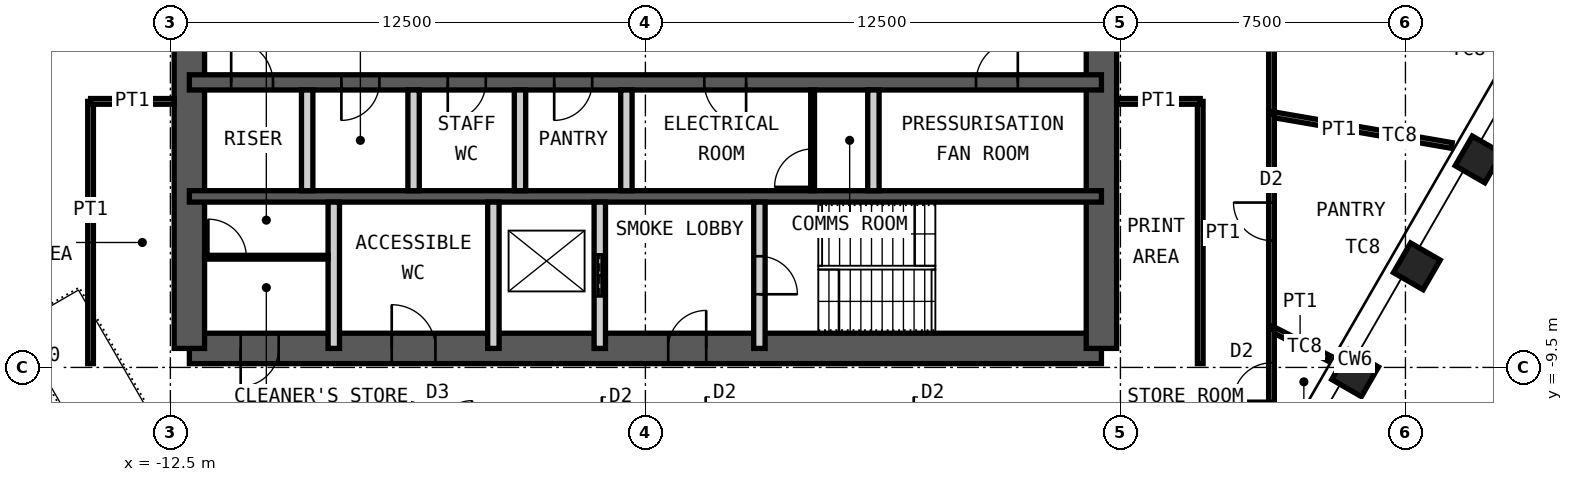
"""IFC4 building model, lengths in metres.
Left out: names, types, materials, properties, quantities, classifications, styles, units other than length and angle.
Written with IfcOpenShell. Run it as: python <this file> out.ifc"""

import sys

from ifc_helpers import new_model, si_unit, direction, frame, frame_2d, origin, origin_2d, place, context, subcontext, project, spatial, rectangle, hollow_rectangle, extrude, element, fill, save


model = new_model("IFC4")
c1 = context("Model", 3, precision=1e-05, world=origin(), true_north=direction((0.0, 1.0)))
c2 = subcontext(c1, "Body", "Model", "MODEL_VIEW")
j1 = project(units=[si_unit("LENGTHUNIT", "METRE"), si_unit("PLANEANGLEUNIT", "RADIAN")], contexts=[c1])
p1 = place(None, origin())
s1 = spatial("IfcSite", under=j1, at=p1, CompositionType="ELEMENT")
p2 = place(p1, origin())
s2 = spatial("IfcBuilding", under=s1, at=p2, CompositionType="ELEMENT")
p3 = place(p2, frame((0.0, 0.0, 333.4)))
s3 = spatial("IfcBuildingStorey", under=s2, at=p3, CompositionType="ELEMENT", Elevation=333.4)
for number, where, z_axis, x_axis in (
    (1, (21.924, -4.027, 0.0), (0.0, 0.0, 1.0), (0.5, 0.866, 0.0)),
    (2, (20.3, -6.84, 0.0), (0.0, 0.0, 1.0), (0.5, 0.866, 0.0)),
    (3, (18.676, -9.653, 0.0), (0.0, 0.0, 1.0), (0.5, 0.866, 0.0)),
):
    element("IfcColumn", number, at=place(p3, frame(where, z_axis=z_axis, x_axis=x_axis)), inside=s3, PredefinedType="COLUMN", context=c2, shape_type="SweptSolid", body=[
        extrude(hollow_rectangle(XDim=0.9, YDim=0.9, WallThickness=0.05, at=origin_2d()), origin(), (0.0, 0.0, 1.0), 4.2),
    ])
p4 = place(p3, frame((-12.0, -9.0, 0.0), z_axis=(0.0, 0.0, 1.0), x_axis=(1.0, 0.0, 0.0)))
e4 = element("IfcWall", 4, at=p4, inside=s3, PredefinedType="SHEAR", context=c2, shape_type="SweptSolid", body=[
    extrude(rectangle(XDim=24.0, YDim=0.8, at=frame_2d((12.0, 0.0))), origin(), (0.0, 0.0, 1.0), 4.2),
])
p5 = place(p4, frame((1.35, 0.0, 0.0)))
e5 = element("IfcOpeningElement", 5, at=p5, cuts=e4, PredefinedType="OPENING", context=c2, shape_type="SweptSolid", body=[
    extrude(rectangle(XDim=1.0, YDim=2.1, at=frame_2d((0.5, 1.05))), frame((0.0, 0.41, 0.0), z_axis=(0.0, -1.0, 0.0), x_axis=(1.0, 0.0, 0.0)), (0.0, 0.0, 1.0), 0.82),
])
p6 = place(p4, frame((5.325, 0.0, 0.0)))
e6 = element("IfcOpeningElement", 6, at=p6, cuts=e4, PredefinedType="OPENING", context=c2, shape_type="SweptSolid", body=[
    extrude(rectangle(XDim=1.15, YDim=2.1, at=frame_2d((0.575, 1.05))), frame((0.0, 0.41, 0.0), z_axis=(0.0, -1.0, 0.0), x_axis=(1.0, 0.0, 0.0)), (0.0, 0.0, 1.0), 0.82),
])
p7 = place(p4, frame((12.6, 0.0, 0.0)))
e7 = element("IfcOpeningElement", 7, at=p7, cuts=e4, PredefinedType="OPENING", context=c2, shape_type="SweptSolid", body=[
    extrude(rectangle(XDim=1.0, YDim=2.1, at=frame_2d((0.5, 1.05))), frame((0.0, 0.41, 0.0), z_axis=(0.0, -1.0, 0.0), x_axis=(1.0, 0.0, 0.0)), (0.0, 0.0, 1.0), 0.82),
])
p8 = place(p3, frame((12.0, -9.0, 0.0), z_axis=(0.0, 0.0, 1.0), x_axis=(0.0, 1.0, 0.0)))
e8 = element("IfcWall", 8, at=p8, inside=s3, PredefinedType="SHEAR", context=c2, shape_type="SweptSolid", body=[
    extrude(rectangle(XDim=18.0, YDim=0.8, at=frame_2d((9.0, 0.0))), origin(), (0.0, 0.0, 1.0), 4.2),
])
p9 = place(p8, frame((8.1, 0.0, 0.0)))
e9 = element("IfcOpeningElement", 9, at=p9, cuts=e8, PredefinedType="OPENING", context=c2, shape_type="SweptSolid", body=[
    extrude(rectangle(XDim=1.8, YDim=2.1, at=frame_2d((0.9, 1.05))), frame((0.0, 0.41, 0.0), z_axis=(0.0, -1.0, 0.0), x_axis=(1.0, 0.0, 0.0)), (0.0, 0.0, 1.0), 0.82),
])
p10 = place(p3, frame((-12.0, -9.0, 0.0), z_axis=(0.0, 0.0, 1.0), x_axis=(0.0, 1.0, 0.0)))
e10 = element("IfcWall", 10, at=p10, inside=s3, PredefinedType="SHEAR", context=c2, shape_type="SweptSolid", body=[
    extrude(rectangle(XDim=18.0, YDim=0.8, at=frame_2d((9.0, 0.0))), origin(), (0.0, 0.0, 1.0), 4.2),
])
p11 = place(p10, frame((8.1, 0.0, 0.0)))
e11 = element("IfcOpeningElement", 11, at=p11, cuts=e10, PredefinedType="OPENING", context=c2, shape_type="SweptSolid", body=[
    extrude(rectangle(XDim=1.8, YDim=2.1, at=frame_2d((0.9, 1.05))), frame((0.0, 0.41, 0.0), z_axis=(0.0, -1.0, 0.0), x_axis=(1.0, 0.0, 0.0)), (0.0, 0.0, 1.0), 0.82),
])
p12 = place(p3, frame((-12.0, -2.0, 0.0), z_axis=(0.0, 0.0, 1.0), x_axis=(1.0, 0.0, 0.0)))
e12 = element("IfcWall", 12, at=p12, inside=s3, PredefinedType="SHEAR", context=c2, shape_type="SweptSolid", body=[
    extrude(rectangle(XDim=24.0, YDim=0.4, at=frame_2d((12.0, 0.0))), origin(), (0.0, 0.0, 1.0), 4.2),
])
p13 = place(p12, frame((1.1, 0.0, 0.0)))
e13 = element("IfcOpeningElement", 13, at=p13, cuts=e12, PredefinedType="OPENING", context=c2, shape_type="SweptSolid", body=[
    extrude(rectangle(XDim=1.1, YDim=2.1, at=frame_2d((0.55, 1.05))), frame((0.0, 0.21, 0.0), z_axis=(0.0, -1.0, 0.0), x_axis=(1.0, 0.0, 0.0)), (0.0, 0.0, 1.0), 0.42),
])
p14 = place(p12, frame((13.55, 0.0, 0.0)))
e14 = element("IfcOpeningElement", 14, at=p14, cuts=e12, PredefinedType="OPENING", context=c2, shape_type="SweptSolid", body=[
    extrude(rectangle(XDim=1.1, YDim=2.1, at=frame_2d((0.55, 1.05))), frame((0.0, 0.21, 0.0), z_axis=(0.0, -1.0, 0.0), x_axis=(1.0, 0.0, 0.0)), (0.0, 0.0, 1.0), 0.42),
])
p15 = place(p12, frame((20.7, 0.0, 0.0)))
e15 = element("IfcOpeningElement", 15, at=p15, cuts=e12, PredefinedType="OPENING", context=c2, shape_type="SweptSolid", body=[
    extrude(rectangle(XDim=1.1, YDim=2.1, at=frame_2d((0.55, 1.05))), frame((0.0, 0.21, 0.0), z_axis=(0.0, -1.0, 0.0), x_axis=(1.0, 0.0, 0.0)), (0.0, 0.0, 1.0), 0.42),
])
p16 = place(p12, frame((4.0, 0.0, 0.0)))
e16 = element("IfcOpeningElement", 16, at=p16, cuts=e12, PredefinedType="OPENING", context=c2, shape_type="SweptSolid", body=[
    extrude(rectangle(XDim=1.0, YDim=2.1, at=frame_2d((0.5, 1.05))), frame((0.0, 0.21, 0.0), z_axis=(0.0, -1.0, 0.0), x_axis=(1.0, 0.0, 0.0)), (0.0, 0.0, 1.0), 0.42),
])
p17 = place(p12, frame((6.8, 0.0, 0.0)))
e17 = element("IfcOpeningElement", 17, at=p17, cuts=e12, PredefinedType="OPENING", context=c2, shape_type="SweptSolid", body=[
    extrude(rectangle(XDim=1.0, YDim=2.1, at=frame_2d((0.5, 1.05))), frame((0.0, 0.21, 0.0), z_axis=(0.0, -1.0, 0.0), x_axis=(1.0, 0.0, 0.0)), (0.0, 0.0, 1.0), 0.42),
])
p18 = place(p12, frame((9.6, 0.0, 0.0)))
e18 = element("IfcOpeningElement", 18, at=p18, cuts=e12, PredefinedType="OPENING", context=c2, shape_type="SweptSolid", body=[
    extrude(rectangle(XDim=1.0, YDim=2.1, at=frame_2d((0.5, 1.05))), frame((0.0, 0.21, 0.0), z_axis=(0.0, -1.0, 0.0), x_axis=(1.0, 0.0, 0.0)), (0.0, 0.0, 1.0), 0.42),
])
p19 = place(p3, frame((-12.0, -5.0, 0.0), z_axis=(0.0, 0.0, 1.0), x_axis=(1.0, 0.0, 0.0)))
e19 = element("IfcWall", 19, at=p19, inside=s3, PredefinedType="SHEAR", context=c2, shape_type="SweptSolid", body=[
    extrude(rectangle(XDim=24.0, YDim=0.3, at=frame_2d((12.0, 0.0))), origin(), (0.0, 0.0, 1.0), 4.2),
])
for number, where, z_axis, x_axis in (
    (20, (-8.9, -4.85, 0.0), (0.0, 0.0, 1.0), (0.0, 1.0, 0.0)),
    (21, (-6.1, -4.85, 0.0), (0.0, 0.0, 1.0), (0.0, 1.0, 0.0)),
    (22, (-3.3, -4.85, 0.0), (0.0, 0.0, 1.0), (0.0, 1.0, 0.0)),
    (23, (-0.5, -4.85, 0.0), (0.0, 0.0, 1.0), (0.0, 1.0, 0.0)),
    (24, (6.0, -4.85, 0.0), (0.0, 0.0, 1.0), (0.0, 1.0, 0.0)),
):
    element("IfcWall", number, at=place(p3, frame(where, z_axis=z_axis, x_axis=x_axis)), inside=s3, PredefinedType="PARTITIONING", context=c2, shape_type="SweptSolid", body=[
        extrude(rectangle(XDim=2.65, YDim=0.3, at=frame_2d((1.325, 0.0))), origin(), (0.0, 0.0, 1.0), 3.98),
    ])
for number, where, z_axis, x_axis in (
    (25, (-8.2, -9.0, 0.0), (0.0, 0.0, 1.0), (0.0, 1.0, 0.0)),
    (26, (-4.0, -9.0, 0.0), (0.0, 0.0, 1.0), (0.0, 1.0, 0.0)),
):
    element("IfcWall", number, at=place(p3, frame(where, z_axis=z_axis, x_axis=x_axis)), inside=s3, PredefinedType="PARTITIONING", context=c2, shape_type="SweptSolid", body=[
        extrude(rectangle(XDim=3.85, YDim=0.3, at=frame_2d((1.925, 0.0))), origin(), (0.0, 0.0, 1.0), 3.98),
    ])
p20 = place(p3, frame((-1.2, -9.0, 0.0), z_axis=(0.0, 0.0, 1.0), x_axis=(0.0, 1.0, 0.0)))
e27 = element("IfcWall", 27, at=p20, inside=s3, PredefinedType="PARTITIONING", context=c2, shape_type="SweptSolid", body=[
    extrude(rectangle(XDim=3.85, YDim=0.3, at=frame_2d((1.925, 0.0))), origin(), (0.0, 0.0, 1.0), 3.98),
])
p21 = place(p20, frame((1.375, 0.0, 0.0)))
e28 = element("IfcOpeningElement", 28, at=p21, cuts=e27, PredefinedType="OPENING", context=c2, shape_type="SweptSolid", body=[
    extrude(rectangle(XDim=1.1, YDim=2.4, at=frame_2d((0.55, 1.2))), frame((0.0, 0.16, 0.0), z_axis=(0.0, -1.0, 0.0), x_axis=(1.0, 0.0, 0.0)), (0.0, 0.0, 1.0), 0.32),
])
p22 = place(p3, frame((3.0, -9.0, 0.0), z_axis=(0.0, 0.0, 1.0), x_axis=(0.0, 1.0, 0.0)))
e29 = element("IfcWall", 29, at=p22, inside=s3, PredefinedType="PARTITIONING", context=c2, shape_type="SweptSolid", body=[
    extrude(rectangle(XDim=3.85, YDim=0.3, at=frame_2d((1.925, 0.0))), origin(), (0.0, 0.0, 1.0), 3.98),
])
p23 = place(p22, frame((1.425, 0.0, 0.0)))
e30 = element("IfcOpeningElement", 30, at=p23, cuts=e29, PredefinedType="OPENING", context=c2, shape_type="SweptSolid", body=[
    extrude(rectangle(XDim=1.0, YDim=2.1, at=frame_2d((0.5, 1.05))), frame((0.0, 0.16, 0.0), z_axis=(0.0, -1.0, 0.0), x_axis=(1.0, 0.0, 0.0)), (0.0, 0.0, 1.0), 0.32),
])
p24 = place(p3, frame((4.4, -4.85, 0.0), z_axis=(0.0, 0.0, 1.0), x_axis=(0.0, 1.0, 0.0)))
e31 = element("IfcWall", 31, at=p24, inside=s3, PredefinedType="PARTITIONING", context=c2, shape_type="SweptSolid", body=[
    extrude(rectangle(XDim=2.65, YDim=0.1, at=frame_2d((1.325, 0.0))), origin(), (0.0, 0.0, 1.0), 3.98),
])
p25 = place(p24, frame((0.1, 0.0, 0.0)))
e32 = element("IfcOpeningElement", 32, at=p25, cuts=e31, PredefinedType="OPENING", context=c2, shape_type="SweptSolid", body=[
    extrude(rectangle(XDim=1.0, YDim=2.4, at=frame_2d((0.5, 1.2))), frame((0.0, 0.06, 0.0), z_axis=(0.0, -1.0, 0.0), x_axis=(1.0, 0.0, 0.0)), (0.0, 0.0, 1.0), 0.12),
])
p26 = place(p3, frame((-11.6, -6.6, 0.0), z_axis=(0.0, 0.0, 1.0), x_axis=(1.0, 0.0, 0.0)))
e33 = element("IfcWall", 33, at=p26, inside=s3, PredefinedType="PARTITIONING", context=c2, shape_type="SweptSolid", body=[
    extrude(rectangle(XDim=3.25, YDim=0.1, at=frame_2d((1.625, 0.0))), origin(), (0.0, 0.0, 1.0), 3.98),
])
p27 = place(p26, frame((0.1, 0.0, 0.0)))
e34 = element("IfcOpeningElement", 34, at=p27, cuts=e33, PredefinedType="OPENING", context=c2, shape_type="SweptSolid", body=[
    extrude(rectangle(XDim=1.0, YDim=2.4, at=frame_2d((0.5, 1.2))), frame((0.0, 0.06, 0.0), z_axis=(0.0, -1.0, 0.0), x_axis=(1.0, 0.0, 0.0)), (0.0, 0.0, 1.0), 0.12),
])
p28 = place(p3, frame((16.475, 11.275, 0.0), z_axis=(0.0, 0.0, 1.0), x_axis=(0.0, -1.0, 0.0)))
e35 = element("IfcWall", 35, at=p28, inside=s3, PredefinedType="PARTITIONING", context=c2, shape_type="SweptSolid", body=[
    extrude(rectangle(XDim=14.117, YDim=0.15, at=frame_2d((7.058, 0.0))), origin(), (0.0, 0.0, 1.0), 3.92),
])
p29 = place(p28, frame((6.158, 0.0, 0.0)))
e36 = element("IfcOpeningElement", 36, at=p29, cuts=e35, PredefinedType="OPENING", context=c2, shape_type="SweptSolid", body=[
    extrude(rectangle(XDim=1.8, YDim=2.4, at=frame_2d((0.9, 1.2))), frame((0.0, 0.085, 0.0), z_axis=(0.0, -1.0, 0.0), x_axis=(1.0, 0.0, 0.0)), (0.0, 0.0, 1.0), 0.17),
])
p30 = place(p3, frame((21.219, -3.66, 0.0), z_axis=(0.0, 0.0, 1.0), x_axis=(-0.985444592587, 0.16999692627, 0.0)))
e37 = element("IfcWall", 37, at=p30, inside=s3, PredefinedType="PARTITIONING", context=c2, shape_type="SweptSolid", body=[
    extrude(rectangle(XDim=4.814, YDim=0.15, at=frame_2d((2.407, 0.0))), origin(), (0.0, 0.0, 1.0), 3.02),
])
p31 = place(p3, frame((16.475, -2.842, 0.0), z_axis=(0.0, 0.0, 1.0), x_axis=(0.0, -1.0, 0.0)))
e38 = element("IfcWall", 38, at=p31, inside=s3, PredefinedType="PARTITIONING", context=c2, shape_type="SweptSolid", body=[
    extrude(rectangle(XDim=5.64, YDim=0.15, at=frame_2d((2.82, 0.0))), origin(), (0.0, 0.0, 1.0), 3.92),
])
p32 = place(p31, frame((2.32, 0.0, 0.0)))
e39 = element("IfcOpeningElement", 39, at=p32, cuts=e38, PredefinedType="OPENING", context=c2, shape_type="SweptSolid", body=[
    extrude(rectangle(XDim=1.0, YDim=2.4, at=frame_2d((0.5, 1.2))), frame((0.0, 0.085, 0.0), z_axis=(0.0, -1.0, 0.0), x_axis=(1.0, 0.0, 0.0)), (0.0, 0.0, 1.0), 0.17),
])
p33 = place(p3, frame((17.98, -9.257, 0.0), z_axis=(0.0, 0.0, 1.0), x_axis=(-0.889058145064, 0.457794292991, 0.0)))
e40 = element("IfcWall", 40, at=p33, inside=s3, PredefinedType="PARTITIONING", context=c2, shape_type="SweptSolid", body=[
    extrude(rectangle(XDim=1.693, YDim=0.15, at=frame_2d((0.847, 0.0))), origin(), (0.0, 0.0, 1.0), 2.72),
])
p34 = place(p3, frame((16.475, -8.482, 0.0), z_axis=(0.0, 0.0, 1.0), x_axis=(0.0, -1.0, 0.0)))
e41 = element("IfcWall", 41, at=p34, inside=s3, PredefinedType="PARTITIONING", context=c2, shape_type="SweptSolid", body=[
    extrude(rectangle(XDim=2.793, YDim=0.15, at=frame_2d((1.396, 0.0))), origin(), (0.0, 0.0, 1.0), 3.92),
])
p35 = place(p34, frame((0.896, 0.0, 0.0)))
e42 = element("IfcOpeningElement", 42, at=p35, cuts=e41, PredefinedType="OPENING", context=c2, shape_type="SweptSolid", body=[
    extrude(rectangle(XDim=1.0, YDim=2.4, at=frame_2d((0.5, 1.2))), frame((0.0, 0.085, 0.0), z_axis=(0.0, -1.0, 0.0), x_axis=(1.0, 0.0, 0.0)), (0.0, 0.0, 1.0), 0.17),
])
p36 = place(p3, frame((14.6, -9.4, 0.0), z_axis=(0.0, 0.0, 1.0), x_axis=(0.0, 1.0, 0.0)))
e43 = element("IfcWall", 43, at=p36, inside=s3, PredefinedType="PARTITIONING", context=c2, shape_type="SweptSolid", body=[
    extrude(rectangle(XDim=6.9, YDim=0.15, at=frame_2d((3.45, 0.0))), origin(), (0.0, 0.0, 1.0), 3.92),
])
p37 = place(p3, frame((12.4, -2.5, 0.0), z_axis=(0.0, 0.0, 1.0), x_axis=(1.0, 0.0, 0.0)))
e44 = element("IfcWall", 44, at=p37, inside=s3, PredefinedType="PARTITIONING", context=c2, shape_type="SweptSolid", body=[
    extrude(rectangle(XDim=2.2, YDim=0.15, at=frame_2d((1.1, 0.0))), origin(), (0.0, 0.0, 1.0), 3.02),
])
p38 = place(p3, frame((-14.6, -9.4, 0.0), z_axis=(0.0, 0.0, 1.0), x_axis=(0.0, 1.0, 0.0)))
e45 = element("IfcWall", 45, at=p38, inside=s3, PredefinedType="PARTITIONING", context=c2, shape_type="SweptSolid", body=[
    extrude(rectangle(XDim=6.9, YDim=0.15, at=frame_2d((3.45, 0.0))), origin(), (0.0, 0.0, 1.0), 3.92),
])
p39 = place(p3, frame((-12.4, -2.5, 0.0), z_axis=(0.0, 0.0, 1.0), x_axis=(-1.0, 0.0, 0.0)))
e46 = element("IfcWall", 46, at=p39, inside=s3, PredefinedType="PARTITIONING", context=c2, shape_type="SweptSolid", body=[
    extrude(rectangle(XDim=2.2, YDim=0.15, at=frame_2d((1.1, 0.0))), origin(), (0.0, 0.0, 1.0), 3.12),
])
p40 = place(p5, origin())
e47 = element("IfcDoor", 47, at=p40, inside=s3, OperationType="SINGLE_SWING_LEFT", PredefinedType="DOOR", context=c2, shape_type="SweptSolid", body=[
    extrude(rectangle(XDim=1.0, YDim=2.1, at=frame_2d((0.5, 1.05))), frame((0.0, 0.025, 0.0), z_axis=(0.0, -1.0, 0.0), x_axis=(1.0, 0.0, 0.0)), (0.0, 0.0, 1.0), 0.05),
])
fill(e5, e47)
p41 = place(p6, origin())
e48 = element("IfcDoor", 48, at=p41, inside=s3, OperationType="SINGLE_SWING_RIGHT", PredefinedType="DOOR", context=c2, shape_type="SweptSolid", body=[
    extrude(rectangle(XDim=1.15, YDim=2.1, at=frame_2d((0.575, 1.05))), frame((0.0, 0.025, 0.0), z_axis=(0.0, -1.0, 0.0), x_axis=(1.0, 0.0, 0.0)), (0.0, 0.0, 1.0), 0.05),
])
fill(e6, e48)
p42 = place(p7, origin())
e49 = element("IfcDoor", 49, at=p42, inside=s3, OperationType="SINGLE_SWING_LEFT", PredefinedType="DOOR", context=c2, shape_type="SweptSolid", body=[
    extrude(rectangle(XDim=1.0, YDim=2.1, at=frame_2d((0.5, 1.05))), frame((0.0, 0.025, 0.0), z_axis=(0.0, -1.0, 0.0), x_axis=(1.0, 0.0, 0.0)), (0.0, 0.0, 1.0), 0.05),
])
fill(e7, e49)
p43 = place(p23, origin())
e50 = element("IfcDoor", 50, at=p43, inside=s3, OperationType="SINGLE_SWING_LEFT", PredefinedType="DOOR", context=c2, shape_type="SweptSolid", body=[
    extrude(rectangle(XDim=1.0, YDim=2.1, at=frame_2d((0.5, 1.05))), frame((0.0, 0.025, 0.0), z_axis=(0.0, -1.0, 0.0), x_axis=(1.0, 0.0, 0.0)), (0.0, 0.0, 1.0), 0.05),
])
fill(e30, e50)
p44 = place(p13, origin())
e51 = element("IfcDoor", 51, at=p44, inside=s3, OperationType="SINGLE_SWING_RIGHT", PredefinedType="DOOR", context=c2, shape_type="SweptSolid", body=[
    extrude(rectangle(XDim=1.1, YDim=2.1, at=frame_2d((0.55, 1.05))), frame((0.0, 0.025, 0.0), z_axis=(0.0, -1.0, 0.0), x_axis=(1.0, 0.0, 0.0)), (0.0, 0.0, 1.0), 0.05),
])
fill(e13, e51)
p45 = place(p14, origin())
e52 = element("IfcDoor", 52, at=p45, inside=s3, OperationType="SINGLE_SWING_RIGHT", PredefinedType="DOOR", context=c2, shape_type="SweptSolid", body=[
    extrude(rectangle(XDim=1.1, YDim=2.1, at=frame_2d((0.55, 1.05))), frame((0.0, 0.025, 0.0), z_axis=(0.0, -1.0, 0.0), x_axis=(1.0, 0.0, 0.0)), (0.0, 0.0, 1.0), 0.05),
])
fill(e14, e52)
p46 = place(p15, origin())
e53 = element("IfcDoor", 53, at=p46, inside=s3, OperationType="SINGLE_SWING_LEFT", PredefinedType="DOOR", context=c2, shape_type="SweptSolid", body=[
    extrude(rectangle(XDim=1.1, YDim=2.1, at=frame_2d((0.55, 1.05))), frame((0.0, 0.025, 0.0), z_axis=(0.0, -1.0, 0.0), x_axis=(1.0, 0.0, 0.0)), (0.0, 0.0, 1.0), 0.05),
])
fill(e15, e53)
p47 = place(p21, origin())
e54 = element("IfcDoor", 54, at=p47, inside=s3, OperationType="DOUBLE_DOOR_SLIDING", PredefinedType="DOOR", context=c2, shape_type="SweptSolid", body=[
    extrude(rectangle(XDim=1.1, YDim=2.4, at=frame_2d((0.55, 1.2))), frame((0.0, 0.025, 0.0), z_axis=(0.0, -1.0, 0.0), x_axis=(1.0, 0.0, 0.0)), (0.0, 0.0, 1.0), 0.05),
])
fill(e28, e54)
p48 = place(p16, origin())
e55 = element("IfcDoor", 55, at=p48, inside=s3, OperationType="SINGLE_SWING_LEFT", PredefinedType="DOOR", context=c2, shape_type="SweptSolid", body=[
    extrude(rectangle(XDim=1.0, YDim=2.1, at=frame_2d((0.5, 1.05))), frame((0.0, 0.025, 0.0), z_axis=(0.0, -1.0, 0.0), x_axis=(1.0, 0.0, 0.0)), (0.0, 0.0, 1.0), 0.05),
])
fill(e16, e55)
p49 = place(p17, origin())
e56 = element("IfcDoor", 56, at=p49, inside=s3, OperationType="SINGLE_SWING_LEFT", PredefinedType="DOOR", context=c2, shape_type="SweptSolid", body=[
    extrude(rectangle(XDim=1.0, YDim=2.1, at=frame_2d((0.5, 1.05))), frame((0.0, 0.025, 0.0), z_axis=(0.0, -1.0, 0.0), x_axis=(1.0, 0.0, 0.0)), (0.0, 0.0, 1.0), 0.05),
])
fill(e17, e56)
p50 = place(p18, origin())
e57 = element("IfcDoor", 57, at=p50, inside=s3, OperationType="SINGLE_SWING_LEFT", PredefinedType="DOOR", context=c2, shape_type="SweptSolid", body=[
    extrude(rectangle(XDim=1.0, YDim=2.1, at=frame_2d((0.5, 1.05))), frame((0.0, 0.025, 0.0), z_axis=(0.0, -1.0, 0.0), x_axis=(1.0, 0.0, 0.0)), (0.0, 0.0, 1.0), 0.05),
])
fill(e18, e57)
p51 = place(p25, origin())
e58 = element("IfcDoor", 58, at=p51, inside=s3, OperationType="SINGLE_SWING_RIGHT", PredefinedType="DOOR", context=c2, shape_type="SweptSolid", body=[
    extrude(rectangle(XDim=1.0, YDim=2.4, at=frame_2d((0.5, 1.2))), frame((0.0, 0.025, 0.0), z_axis=(0.0, -1.0, 0.0), x_axis=(1.0, 0.0, 0.0)), (0.0, 0.0, 1.0), 0.05),
])
fill(e32, e58)
p52 = place(p27, origin())
e59 = element("IfcDoor", 59, at=p52, inside=s3, OperationType="SINGLE_SWING_RIGHT", PredefinedType="DOOR", context=c2, shape_type="SweptSolid", body=[
    extrude(rectangle(XDim=1.0, YDim=2.4, at=frame_2d((0.5, 1.2))), frame((0.0, 0.025, 0.0), z_axis=(0.0, -1.0, 0.0), x_axis=(1.0, 0.0, 0.0)), (0.0, 0.0, 1.0), 0.05),
])
fill(e34, e59)
p53 = place(p32, origin())
e60 = element("IfcDoor", 60, at=p53, inside=s3, OperationType="SINGLE_SWING_LEFT", PredefinedType="DOOR", context=c2, shape_type="SweptSolid", body=[
    extrude(rectangle(XDim=1.0, YDim=2.4, at=frame_2d((0.5, 1.2))), frame((0.0, 0.025, 0.0), z_axis=(0.0, -1.0, 0.0), x_axis=(1.0, 0.0, 0.0)), (0.0, 0.0, 1.0), 0.05),
])
fill(e39, e60)
p54 = place(p35, origin())
e61 = element("IfcDoor", 61, at=p54, inside=s3, OperationType="SINGLE_SWING_RIGHT", PredefinedType="DOOR", context=c2, shape_type="SweptSolid", body=[
    extrude(rectangle(XDim=1.0, YDim=2.4, at=frame_2d((0.5, 1.2))), frame((0.0, 0.025, 0.0), z_axis=(0.0, -1.0, 0.0), x_axis=(1.0, 0.0, 0.0)), (0.0, 0.0, 1.0), 0.05),
])
fill(e42, e61)
save(model, sys.argv[1])
